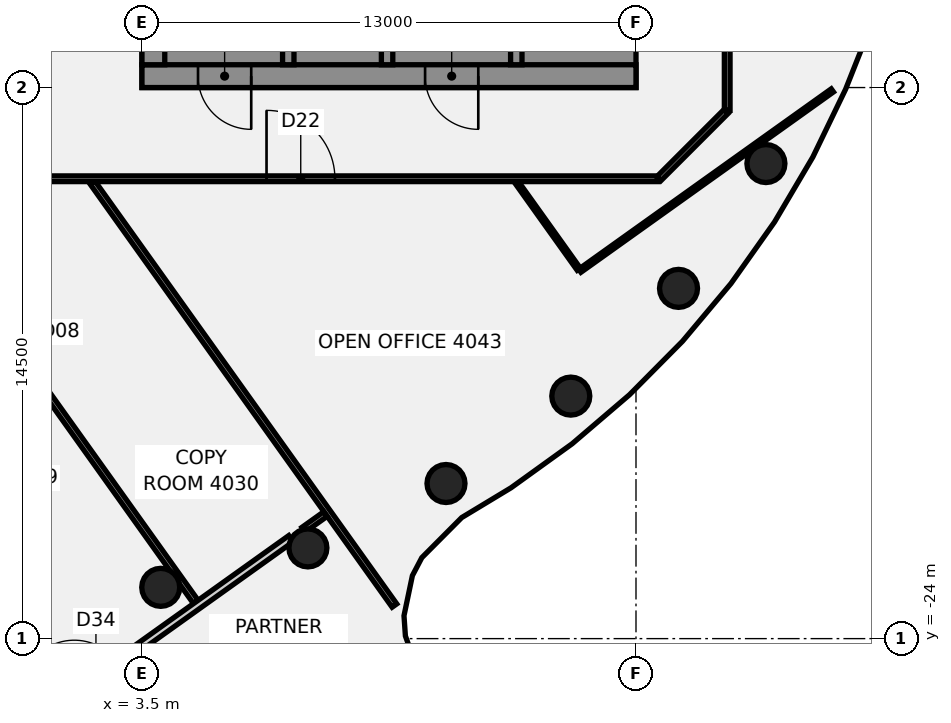
"""IFC4 building model, lengths in metres.
Left out: names, types, materials, properties, quantities, classifications, styles, units other than length and angle.
Written with IfcOpenShell. Run it as: python <this file> out.ifc"""

import sys

from ifc_helpers import new_model, si_unit, direction, frame, frame_2d, origin, origin_2d, place, context, subcontext, project, spatial, polyline, rectangle, circle, outline, extrude, element, fill, save


model = new_model("IFC4")
c1 = context("Model", 3, precision=1e-05, world=origin(), true_north=direction((0.0, 1.0)))
c2 = subcontext(c1, "Body", "Model", "MODEL_VIEW")
j1 = project(units=[si_unit("LENGTHUNIT", "METRE"), si_unit("PLANEANGLEUNIT", "RADIAN")], contexts=[c1])
p1 = place(None, origin())
s1 = spatial("IfcSite", under=j1, at=p1, CompositionType="ELEMENT")
p2 = place(p1, origin())
s2 = spatial("IfcBuilding", under=s1, at=p2, CompositionType="ELEMENT")
p3 = place(p2, frame((0.0, 0.0, 163.0)))
s3 = spatial("IfcBuildingStorey", under=s2, at=p3, CompositionType="ELEMENT", Elevation=163.0)
for number, where, z_axis, x_axis in (
    (1, (3.994, -22.651, -0.14), (0.0, 0.0, 1.0), (1.0, 0.0, 0.0)),
    (2, (7.866, -21.613, -0.14), (0.0, 0.0, 1.0), (1.0, 0.0, 0.0)),
    (3, (11.5, -19.919, -0.14), (0.0, 0.0, 1.0), (1.0, 0.0, 0.0)),
    (4, (14.784, -17.619, -0.14), (0.0, 0.0, 1.0), (1.0, 0.0, 0.0)),
    (5, (17.619, -14.784, -0.14), (0.0, 0.0, 1.0), (1.0, 0.0, 0.0)),
    (6, (19.919, -11.5, -0.14), (0.0, 0.0, 1.0), (1.0, 0.0, 0.0)),
):
    element("IfcColumn", number, at=place(p3, frame(where, z_axis=z_axis, x_axis=x_axis)), inside=s3, PredefinedType="COLUMN", context=c2, shape_type="SweptSolid", body=[
        extrude(circle(Radius=0.5, at=origin_2d()), origin(), (0.0, 0.0, 1.0), 3.75),
    ])
p4 = place(p3, frame((-2.96, -12.002, 0.0), z_axis=(0.0, 0.0, 1.0), x_axis=(0.581045686684, -0.813870941849, 0.0)))
e7 = element("IfcWall", 7, at=p4, inside=s3, PredefinedType="PARTITIONING", context=c2, shape_type="SweptSolid", body=[
    extrude(rectangle(XDim=13.557, YDim=0.15, at=frame_2d((6.779, 0.0))), origin(), (0.0, 0.0, 1.0), 3.01),
])
p5 = place(p4, frame((4.375, 0.0, 0.0)))
e8 = element("IfcOpeningElement", 8, at=p5, cuts=e7, PredefinedType="OPENING", context=c2, shape_type="SweptSolid", body=[
    extrude(rectangle(XDim=0.9, YDim=2.1, at=frame_2d((0.45, 1.05))), frame((0.0, 0.085, 0.0), z_axis=(0.0, -1.0, 0.0), x_axis=(1.0, 0.0, 0.0)), (0.0, 0.0, 1.0), 0.17),
])
p6 = place(p3, frame((2.201, -12.002, 0.0), z_axis=(0.0, 0.0, 1.0), x_axis=(0.580967898018, -0.813926471785, 0.0)))
e9 = element("IfcWall", 9, at=p6, inside=s3, PredefinedType="PARTITIONING", context=c2, shape_type="SweptSolid", body=[
    extrude(rectangle(XDim=13.672, YDim=0.15, at=frame_2d((6.836, 0.0))), origin(), (0.0, 0.0, 1.0), 3.01),
])
p7 = place(p3, frame((13.355, -11.986, 0.0), z_axis=(0.0, 0.0, 1.0), x_axis=(0.581139863007, -0.813803698458, 0.0)))
e10 = element("IfcWall", 10, at=p7, inside=s3, PredefinedType="PARTITIONING", context=c2, shape_type="SweptSolid", body=[
    extrude(rectangle(XDim=2.819, YDim=0.1, at=frame_2d((1.409, 0.0))), origin(), (0.0, 0.0, 1.0), 3.01),
])
p8 = place(p3, frame((-17.1, -11.9, 0.0), z_axis=(0.0, 0.0, 1.0), x_axis=(1.0, 0.0, 0.0)))
e11 = element("IfcWall", 11, at=p8, inside=s3, PredefinedType="PARTITIONING", context=c2, shape_type="SweptSolid", body=[
    extrude(rectangle(XDim=34.165, YDim=0.15, at=frame_2d((17.083, 0.0))), origin(), (0.0, 0.0, 1.0), 3.01),
])
p9 = place(p8, frame((9.703, 0.0, 0.0)))
e12 = element("IfcOpeningElement", 12, at=p9, cuts=e11, PredefinedType="OPENING", context=c2, shape_type="SweptSolid", body=[
    extrude(rectangle(XDim=1.8, YDim=2.1, at=frame_2d((0.9, 1.05))), frame((0.0, 0.085, 0.0), z_axis=(0.0, -1.0, 0.0), x_axis=(1.0, 0.0, 0.0)), (0.0, 0.0, 1.0), 0.17),
])
p10 = place(p8, frame((1.95, 0.0, 0.0)))
e13 = element("IfcOpeningElement", 13, at=p10, cuts=e11, PredefinedType="OPENING", context=c2, shape_type="SweptSolid", body=[
    extrude(rectangle(XDim=1.8, YDim=2.1, at=frame_2d((0.9, 1.05))), frame((0.0, 0.085, 0.0), z_axis=(0.0, -1.0, 0.0), x_axis=(1.0, 0.0, 0.0)), (0.0, 0.0, 1.0), 0.17),
])
p11 = place(p8, frame((23.878, 0.0, 0.0)))
e14 = element("IfcOpeningElement", 14, at=p11, cuts=e11, PredefinedType="OPENING", context=c2, shape_type="SweptSolid", body=[
    extrude(rectangle(XDim=1.8, YDim=2.1, at=frame_2d((0.9, 1.05))), frame((0.0, 0.085, 0.0), z_axis=(0.0, -1.0, 0.0), x_axis=(1.0, 0.0, 0.0)), (0.0, 0.0, 1.0), 0.17),
])
p12 = place(p3, frame((-3.244, -28.985, 0.0), z_axis=(0.0, 0.0, 1.0), x_axis=(0.813830379287, 0.581102498489, 0.0)))
e15 = element("IfcWall", 15, at=p12, inside=s3, PredefinedType="PARTITIONING", context=c2, shape_type="SweptSolid", body=[
    extrude(rectangle(XDim=13.106, YDim=0.2, at=frame_2d((6.553, 0.0))), origin(), (0.0, 0.0, 1.0), 3.01),
])
p13 = place(p12, frame((6.099, 0.0, 0.0)))
e16 = element("IfcOpeningElement", 16, at=p13, cuts=e15, PredefinedType="OPENING", context=c2, shape_type="SweptSolid", body=[
    extrude(rectangle(XDim=1.4, YDim=2.1, at=frame_2d((0.7, 1.05))), frame((0.0, 0.11, 0.0), z_axis=(0.0, -1.0, 0.0), x_axis=(1.0, 0.0, 0.0)), (0.0, 0.0, 1.0), 0.22),
])
p14 = place(p3, frame((7.752, -21.134, 0.0), z_axis=(0.0, 0.0, 1.0), x_axis=(0.813756818138, 0.581205506628, 0.0)))
e17 = element("IfcWall", 17, at=p14, inside=s3, PredefinedType="PARTITIONING", context=c2, shape_type="SweptSolid", body=[
    extrude(rectangle(XDim=0.707, YDim=0.15, at=frame_2d((0.353, 0.0))), origin(), (0.0, 0.0, 1.0), 3.01),
])
p15 = place(p3, frame((15.022, -14.32, 0.0), z_axis=(0.0, 0.0, 1.0), x_axis=(0.813848610714, 0.581076964643, 0.0)))
e18 = element("IfcWall", 18, at=p15, inside=s3, PredefinedType="PARTITIONING", context=c2, shape_type="SweptSolid", body=[
    extrude(rectangle(XDim=8.165, YDim=0.1, at=frame_2d((4.083, 0.0))), origin(), (0.0, 0.0, 1.0), 3.01),
])
p16 = place(p3, frame((17.1, -11.9, 0.0), z_axis=(0.0, 0.0, 1.0), x_axis=(0.707106781187, 0.707106781187, 0.0)))
e19 = element("IfcWall", 19, at=p16, inside=s3, PredefinedType="PARTITIONING", context=c2, shape_type="SweptSolid", body=[
    extrude(rectangle(XDim=2.505, YDim=0.15, at=frame_2d((1.253, 0.0))), origin(), (0.0, 0.0, 1.0), 3.01),
])
p17 = place(p3, frame((18.9, -10.1, 0.0), z_axis=(0.0, 0.0, 1.0), x_axis=(0.0, 1.0, 0.0)))
e20 = element("IfcWall", 20, at=p17, inside=s3, PredefinedType="PARTITIONING", context=c2, shape_type="SweptSolid", body=[
    extrude(rectangle(XDim=20.2, YDim=0.15, at=frame_2d((10.1, 0.0))), origin(), (0.0, 0.0, 1.0), 3.01),
])
p18 = place(p17, frame((7.909, 0.0, 0.0)))
e21 = element("IfcOpeningElement", 21, at=p18, cuts=e20, PredefinedType="OPENING", context=c2, shape_type="SweptSolid", body=[
    extrude(rectangle(XDim=1.8, YDim=2.1, at=frame_2d((0.9, 1.05))), frame((0.0, 0.085, 0.0), z_axis=(0.0, -1.0, 0.0), x_axis=(1.0, 0.0, 0.0)), (0.0, 0.0, 1.0), 0.17),
])
p19 = place(p3, frame((16.5, -9.2, 0.0), z_axis=(0.0, 0.0, 1.0), x_axis=(-1.0, 0.0, 0.0)))
e22 = element("IfcWall", 22, at=p19, inside=s3, PredefinedType="SHEAR", context=c2, shape_type="SweptSolid", body=[
    extrude(rectangle(XDim=13.0, YDim=0.6, at=frame_2d((6.5, 0.0))), origin(), (0.0, 0.0, 1.0), 3.61),
])
p20 = place(p19, frame((4.15, 0.0, 0.0)))
e23 = element("IfcOpeningElement", 23, at=p20, cuts=e22, PredefinedType="OPENING", context=c2, shape_type="SweptSolid", body=[
    extrude(rectangle(XDim=1.4, YDim=2.1, at=frame_2d((0.7, 1.05))), frame((0.0, 0.31, 0.0), z_axis=(0.0, -1.0, 0.0), x_axis=(1.0, 0.0, 0.0)), (0.0, 0.0, 1.0), 0.62),
])
p21 = place(p19, frame((10.125, 0.0, 0.0)))
e24 = element("IfcOpeningElement", 24, at=p21, cuts=e22, PredefinedType="OPENING", context=c2, shape_type="SweptSolid", body=[
    extrude(rectangle(XDim=1.4, YDim=2.1, at=frame_2d((0.7, 1.05))), frame((0.0, 0.31, 0.0), z_axis=(0.0, -1.0, 0.0), x_axis=(1.0, 0.0, 0.0)), (0.0, 0.0, 1.0), 0.62),
])
p22 = place(p3, origin())
e25 = element("IfcWall", 25, at=p22, inside=s3, PredefinedType="SHEAR", context=c2, shape_type="SweptSolid", body=[
    extrude(outline(polyline([(13.5, -8.125), (13.5, -8.9), (15.9, -8.9), (16.5, -8.9), (16.5, 8.9), (15.9, 8.9), (13.5, 8.9), (13.5, 8.125), (15.9, 8.125), (15.9, 5.625), (13.5, 5.625), (13.5, 5.375), (15.9, 5.375), (15.9, -5.375), (13.5, -5.375), (13.5, -5.625), (15.9, -5.625), (15.9, -8.125), (13.5, -8.125)])), origin(), (0.0, 0.0, 1.0), 3.61),
])
p23 = place(p3, origin())
e26 = element("IfcWall", 26, at=p23, inside=s3, PredefinedType="SHEAR", context=c2, shape_type="SweptSolid", body=[
    extrude(outline(polyline([(7.5, -8.125), (7.5, -8.9), (9.8, -8.9), (9.8, -8.125), (9.8, -5.625), (9.55, -5.625), (9.55, -8.125), (7.5, -8.125)])), origin(), (0.0, 0.0, 1.0), 3.61),
])
p24 = place(p3, frame((7.35, -8.9, 0.0), z_axis=(0.0, 0.0, 1.0), x_axis=(0.0, 1.0, 0.0)))
e27 = element("IfcWall", 27, at=p24, inside=s3, PredefinedType="SHEAR", context=c2, shape_type="SweptSolid", body=[
    extrude(rectangle(XDim=0.775, YDim=0.3, at=frame_2d((0.387, 0.0))), origin(), (0.0, 0.0, 1.0), 3.61),
])
p25 = place(p3, frame((13.35, -8.9, 0.0), z_axis=(0.0, 0.0, 1.0), x_axis=(0.0, 1.0, 0.0)))
e28 = element("IfcWall", 28, at=p25, inside=s3, PredefinedType="SHEAR", context=c2, shape_type="SweptSolid", body=[
    extrude(rectangle(XDim=17.8, YDim=0.3, at=frame_2d((8.9, 0.0))), origin(), (0.0, 0.0, 1.0), 3.61),
])
p26 = place(p25, frame((1.325, 0.0, 0.0)))
e29 = element("IfcOpeningElement", 29, at=p26, cuts=e28, PredefinedType="OPENING", context=c2, shape_type="SweptSolid", body=[
    extrude(rectangle(XDim=1.4, YDim=2.1, at=frame_2d((0.7, 1.05))), frame((0.0, 0.16, 0.0), z_axis=(0.0, -1.0, 0.0), x_axis=(1.0, 0.0, 0.0)), (0.0, 0.0, 1.0), 0.32),
])
p27 = place(p25, frame((4.754, 0.0, 0.0)))
e30 = element("IfcOpeningElement", 30, at=p27, cuts=e28, PredefinedType="OPENING", context=c2, shape_type="SweptSolid", body=[
    extrude(rectangle(XDim=1.0, YDim=2.1, at=frame_2d((0.5, 1.05))), frame((0.0, 0.16, 0.0), z_axis=(0.0, -1.0, 0.0), x_axis=(1.0, 0.0, 0.0)), (0.0, 0.0, 1.0), 0.32),
])
p28 = place(p25, frame((10.254, 0.0, 0.0)))
e31 = element("IfcOpeningElement", 31, at=p28, cuts=e28, PredefinedType="OPENING", context=c2, shape_type="SweptSolid", body=[
    extrude(rectangle(XDim=1.0, YDim=2.1, at=frame_2d((0.5, 1.05))), frame((0.0, 0.16, 0.0), z_axis=(0.0, -1.0, 0.0), x_axis=(1.0, 0.0, 0.0)), (0.0, 0.0, 1.0), 0.32),
])
p29 = place(p3, frame((9.95, -8.9, 0.0), z_axis=(0.0, 0.0, 1.0), x_axis=(0.0, 1.0, 0.0)))
e32 = element("IfcWall", 32, at=p29, inside=s3, PredefinedType="SHEAR", context=c2, shape_type="SweptSolid", body=[
    extrude(rectangle(XDim=17.8, YDim=0.3, at=frame_2d((8.9, 0.0))), origin(), (0.0, 0.0, 1.0), 3.61),
])
p30 = place(p29, frame((4.175, 0.0, 0.0)))
e33 = element("IfcOpeningElement", 33, at=p30, cuts=e32, PredefinedType="OPENING", context=c2, shape_type="SweptSolid", body=[
    extrude(rectangle(XDim=1.2, YDim=2.1, at=frame_2d((0.6, 1.05))), frame((0.0, 0.16, 0.0), z_axis=(0.0, -1.0, 0.0), x_axis=(1.0, 0.0, 0.0)), (0.0, 0.0, 1.0), 0.32),
])
p31 = place(p29, frame((6.925, 0.0, 0.0)))
e34 = element("IfcOpeningElement", 34, at=p31, cuts=e32, PredefinedType="OPENING", context=c2, shape_type="SweptSolid", body=[
    extrude(rectangle(XDim=1.2, YDim=2.1, at=frame_2d((0.6, 1.05))), frame((0.0, 0.16, 0.0), z_axis=(0.0, -1.0, 0.0), x_axis=(1.0, 0.0, 0.0)), (0.0, 0.0, 1.0), 0.32),
])
p32 = place(p3, frame((3.8, -8.9, 0.0), z_axis=(0.0, 0.0, 1.0), x_axis=(0.0, 1.0, 0.0)))
e35 = element("IfcWall", 35, at=p32, inside=s3, PredefinedType="SHEAR", context=c2, shape_type="SweptSolid", body=[
    extrude(rectangle(XDim=17.8, YDim=0.6, at=frame_2d((8.9, 0.0))), origin(), (0.0, 0.0, 1.0), 3.61),
])
p33 = place(p32, frame((1.25, 0.0, 0.0)))
e36 = element("IfcOpeningElement", 36, at=p33, cuts=e35, PredefinedType="OPENING", context=c2, shape_type="SweptSolid", body=[
    extrude(rectangle(XDim=1.8, YDim=2.1, at=frame_2d((0.9, 1.05))), frame((0.0, 0.31, 0.0), z_axis=(0.0, -1.0, 0.0), x_axis=(1.0, 0.0, 0.0)), (0.0, 0.0, 1.0), 0.62),
])
p34 = place(p32, frame((12.377, 0.0, 0.0)))
e37 = element("IfcOpeningElement", 37, at=p34, cuts=e35, PredefinedType="OPENING", context=c2, shape_type="SweptSolid", body=[
    extrude(rectangle(XDim=1.0, YDim=2.1, at=frame_2d((0.5, 1.05))), frame((0.0, 0.31, 0.0), z_axis=(0.0, -1.0, 0.0), x_axis=(1.0, 0.0, 0.0)), (0.0, 0.0, 1.0), 0.62),
])
p35 = place(p32, frame((15.903, 0.0, 0.0)))
e38 = element("IfcOpeningElement", 38, at=p35, cuts=e35, PredefinedType="OPENING", context=c2, shape_type="SweptSolid", body=[
    extrude(rectangle(XDim=1.0, YDim=2.1, at=frame_2d((0.5, 1.05))), frame((0.0, 0.31, 0.0), z_axis=(0.0, -1.0, 0.0), x_axis=(1.0, 0.0, 0.0)), (0.0, 0.0, 1.0), 0.62),
])
p36 = place(p11, frame((1.8, 0.0, 0.0), z_axis=(0.0, 0.0, 1.0), x_axis=(-1.0, 0.0, 0.0)))
e39 = element("IfcDoor", 39, at=p36, inside=s3, OperationType="DOUBLE_DOOR_SINGLE_SWING", PredefinedType="DOOR", context=c2, shape_type="SweptSolid", body=[
    extrude(rectangle(XDim=1.8, YDim=2.1, at=frame_2d((0.9, 1.05))), frame((0.0, 0.025, 0.0), z_axis=(0.0, -1.0, 0.0), x_axis=(1.0, 0.0, 0.0)), (0.0, 0.0, 1.0), 0.05),
])
fill(e14, e39)
p37 = place(p20, origin())
e40 = element("IfcDoor", 40, at=p37, inside=s3, OperationType="SINGLE_SWING_LEFT", PredefinedType="DOOR", context=c2, shape_type="SweptSolid", body=[
    extrude(rectangle(XDim=1.4, YDim=2.1, at=frame_2d((0.7, 1.05))), frame((0.0, 0.025, 0.0), z_axis=(0.0, -1.0, 0.0), x_axis=(1.0, 0.0, 0.0)), (0.0, 0.0, 1.0), 0.05),
])
fill(e23, e40)
p38 = place(p21, origin())
e41 = element("IfcDoor", 41, at=p38, inside=s3, OperationType="SINGLE_SWING_LEFT", PredefinedType="DOOR", context=c2, shape_type="SweptSolid", body=[
    extrude(rectangle(XDim=1.4, YDim=2.1, at=frame_2d((0.7, 1.05))), frame((0.0, 0.025, 0.0), z_axis=(0.0, -1.0, 0.0), x_axis=(1.0, 0.0, 0.0)), (0.0, 0.0, 1.0), 0.05),
])
fill(e24, e41)
save(model, sys.argv[1])
